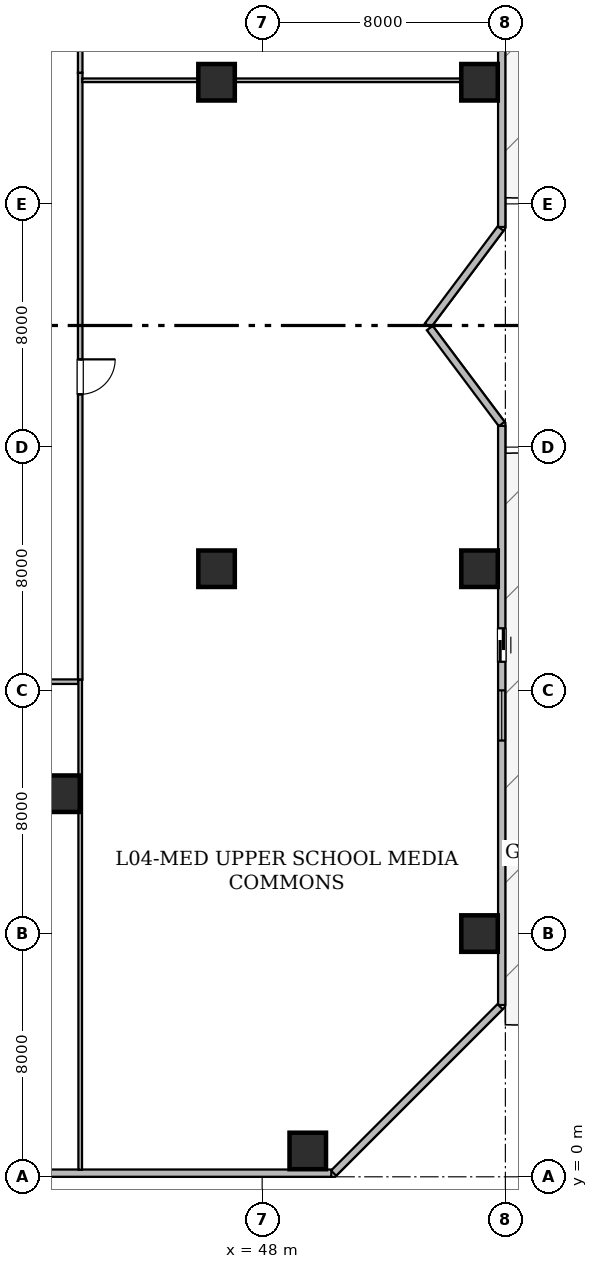
"""IFC4 building model, lengths in metres.
Left out: names, types, materials, properties, quantities, classifications, styles, units other than length and angle.
Written with IfcOpenShell. Run it as: python <this file> out.ifc"""

import sys

from ifc_helpers import new_model, si_unit, direction, frame, frame_2d, origin, origin_2d, place, context, subcontext, project, spatial, rectangle, hollow_rectangle, extrude, element, fill, save


model = new_model("IFC4")
c1 = context("Model", 3, precision=1e-05, world=origin(), true_north=direction((0.0, 1.0)))
c2 = subcontext(c1, "Body", "Model", "MODEL_VIEW")
j1 = project(units=[si_unit("LENGTHUNIT", "METRE"), si_unit("PLANEANGLEUNIT", "RADIAN")], contexts=[c1])
p1 = place(None, origin())
s1 = spatial("IfcSite", under=j1, at=p1, CompositionType="ELEMENT")
p2 = place(p1, origin())
s2 = spatial("IfcBuilding", under=s1, at=p2, CompositionType="ELEMENT")
p3 = place(p2, frame((0.0, 0.0, 20.4)))
s3 = spatial("IfcBuildingStorey", under=s2, at=p3, CompositionType="ELEMENT", Elevation=20.4)
for number, where, z_axis, x_axis in (
    (1, (49.5, 0.85, 0.0), (0.0, 0.0, 1.0), (1.0, 0.0, 0.0)),
    (2, (55.15, 8.0, 0.0), (0.0, 0.0, 1.0), (1.0, 0.0, 0.0)),
    (3, (55.15, 20.0, 0.0), (0.0, 0.0, 1.0), (1.0, 0.0, 0.0)),
    (4, (55.15, 36.0, 0.0), (0.0, 0.0, 1.0), (1.0, 0.0, 0.0)),
    (5, (41.4, 12.6, 0.0), (0.0, 0.0, 1.0), (1.0, 0.0, 0.0)),
    (6, (46.5, 20.0, 0.0), (0.0, 0.0, 1.0), (1.0, 0.0, 0.0)),
    (7, (46.5, 36.0, 0.0), (0.0, 0.0, 1.0), (1.0, 0.0, 0.0)),
):
    element("IfcColumn", number, at=place(p3, frame(where, z_axis=z_axis, x_axis=x_axis)), inside=s3, PredefinedType="COLUMN", context=c2, shape_type="SweptSolid", body=[
        extrude(hollow_rectangle(XDim=1.2, YDim=1.2, WallThickness=0.06, at=origin_2d()), origin(), (0.0, 0.0, 1.0), 4.2),
    ])
p4 = place(p3, frame((55.88, 50.272, 0.0), z_axis=(0.0, 0.0, 1.0), x_axis=(0.0, -1.0, 0.0)))
e8 = element("IfcWall", 8, at=p4, inside=s3, PredefinedType="STANDARD", context=c2, shape_type="SweptSolid", body=[
    extrude(rectangle(XDim=19.032, YDim=0.24, at=frame_2d((9.516, 0.0))), origin(), (0.0, 0.0, 1.0), 3.92),
])
p5 = place(p4, frame((5.0, 0.0, 0.0)))
e9 = element("IfcOpeningElement", 9, at=p5, cuts=e8, PredefinedType="OPENING", context=c2, shape_type="SweptSolid", body=[
    extrude(rectangle(XDim=1.1, YDim=2.2, at=frame_2d((0.55, 1.1))), frame((0.0, 0.13, 0.0), z_axis=(0.0, -1.0, 0.0), x_axis=(1.0, 0.0, 0.0)), (0.0, 0.0, 1.0), 0.26),
])
p6 = place(p4, frame((6.591, 0.0, 0.85)))
e10 = element("IfcOpeningElement", 10, at=p6, cuts=e8, PredefinedType="OPENING", context=c2, shape_type="SweptSolid", body=[
    extrude(rectangle(XDim=1.65, YDim=1.55, at=frame_2d((0.825, 0.775))), frame((0.0, 0.13, 0.0), z_axis=(0.0, -1.0, 0.0), x_axis=(1.0, 0.0, 0.0)), (0.0, 0.0, 1.0), 0.26),
])
p7 = place(p3, frame((55.842, 31.189, 0.0), z_axis=(0.0, 0.0, 1.0), x_axis=(-0.600058791648, -0.799955902889, 0.0)))
e11 = element("IfcWall", 11, at=p7, inside=s3, PredefinedType="STANDARD", context=c2, shape_type="SweptSolid", body=[
    extrude(rectangle(XDim=3.986, YDim=0.24, at=frame_2d((1.993, 0.0))), origin(), (0.0, 0.0, 1.0), 3.92),
])
p8 = place(p3, frame((53.513, 27.916, 0.0), z_axis=(0.0, 0.0, 1.0), x_axis=(0.599990098106, -0.800007426325, 0.0)))
e12 = element("IfcWall", 12, at=p8, inside=s3, PredefinedType="STANDARD", context=c2, shape_type="SweptSolid", body=[
    extrude(rectangle(XDim=3.945, YDim=0.24, at=frame_2d((1.973, 0.0))), origin(), (0.0, 0.0, 1.0), 3.92),
])
p9 = place(p3, frame((55.88, 24.698, 0.0), z_axis=(0.0, 0.0, 1.0), x_axis=(0.0, -1.0, 0.0)))
e13 = element("IfcWall", 13, at=p9, inside=s3, PredefinedType="STANDARD", context=c2, shape_type="SweptSolid", body=[
    extrude(rectangle(XDim=19.048, YDim=0.24, at=frame_2d((9.524, 0.0))), origin(), (0.0, 0.0, 1.0), 3.92),
])
p10 = place(p9, frame((6.658, 0.0, 0.0)))
e14 = element("IfcOpeningElement", 14, at=p10, cuts=e13, PredefinedType="OPENING", context=c2, shape_type="SweptSolid", body=[
    extrude(rectangle(XDim=1.1, YDim=2.2, at=frame_2d((0.55, 1.1))), frame((0.0, 0.13, 0.0), z_axis=(0.0, -1.0, 0.0), x_axis=(1.0, 0.0, 0.0)), (0.0, 0.0, 1.0), 0.26),
])
p11 = place(p9, frame((8.699, 0.0, 0.85)))
e15 = element("IfcOpeningElement", 15, at=p11, cuts=e13, PredefinedType="OPENING", context=c2, shape_type="SweptSolid", body=[
    extrude(rectangle(XDim=1.65, YDim=1.55, at=frame_2d((0.825, 0.775))), frame((0.0, 0.13, 0.0), z_axis=(0.0, -1.0, 0.0), x_axis=(1.0, 0.0, 0.0)), (0.0, 0.0, 1.0), 0.26),
])
p12 = place(p3, frame((55.826, 5.596, 0.0), z_axis=(0.0, 0.0, 1.0), x_axis=(-0.707106781187, -0.707106781187, 0.0)))
e16 = element("IfcWall", 16, at=p12, inside=s3, PredefinedType="STANDARD", context=c2, shape_type="SweptSolid", body=[
    extrude(rectangle(XDim=7.744, YDim=0.24, at=frame_2d((3.872, 0.0))), origin(), (0.0, 0.0, 1.0), 3.92),
])
p13 = place(p3, frame((50.275, 0.12, 0.0), z_axis=(0.0, 0.0, 1.0), x_axis=(-1.0, 0.0, 0.0)))
e17 = element("IfcWall", 17, at=p13, inside=s3, PredefinedType="STANDARD", context=c2, shape_type="SweptSolid", body=[
    extrude(rectangle(XDim=44.55, YDim=0.24, at=frame_2d((22.275, 0.0))), origin(), (0.0, 0.0, 1.0), 3.92),
])
p14 = place(p13, frame((15.35, 0.0, 0.85)))
e18 = element("IfcOpeningElement", 18, at=p14, cuts=e17, PredefinedType="OPENING", context=c2, shape_type="SweptSolid", body=[
    extrude(rectangle(XDim=1.65, YDim=1.55, at=frame_2d((0.825, 0.775))), frame((0.0, 0.13, 0.0), z_axis=(0.0, -1.0, 0.0), x_axis=(1.0, 0.0, 0.0)), (0.0, 0.0, 1.0), 0.26),
])
p15 = place(p3, frame((42.015, 36.314, 0.0), z_axis=(0.0, 0.0, 1.0), x_axis=(0.0, -1.0, 0.0)))
e19 = element("IfcWall", 19, at=p15, inside=s3, PredefinedType="STANDARD", context=c2, shape_type="SweptSolid", body=[
    extrude(rectangle(XDim=19.964, YDim=0.15, at=frame_2d((9.982, 0.0))), origin(), (0.0, 0.0, 1.0), 3.055),
])
p16 = place(p15, frame((9.428, 0.0, 0.0)))
e20 = element("IfcOpeningElement", 20, at=p16, cuts=e19, PredefinedType="OPENING", context=c2, shape_type="SweptSolid", body=[
    extrude(rectangle(XDim=1.15, YDim=2.2, at=frame_2d((0.575, 1.1))), frame((0.0, 0.085, 0.0), z_axis=(0.0, -1.0, 0.0), x_axis=(1.0, 0.0, 0.0)), (0.0, 0.0, 1.0), 0.17),
])
p17 = place(p3, frame((42.015, 39.65, 0.0), z_axis=(0.0, 0.0, 1.0), x_axis=(0.0, -1.0, 0.0)))
e21 = element("IfcWall", 21, at=p17, inside=s3, PredefinedType="STANDARD", context=c2, shape_type="SweptSolid", body=[
    extrude(rectangle(XDim=3.336, YDim=0.15, at=frame_2d((1.668, 0.0))), origin(), (0.0, 0.0, 1.0), 3.055),
])
p18 = place(p17, frame((1.093, 0.0, 0.0)))
e22 = element("IfcOpeningElement", 22, at=p18, cuts=e21, PredefinedType="OPENING", context=c2, shape_type="SweptSolid", body=[
    extrude(rectangle(XDim=1.15, YDim=2.2, at=frame_2d((0.575, 1.1))), frame((0.0, 0.085, 0.0), z_axis=(0.0, -1.0, 0.0), x_axis=(1.0, 0.0, 0.0)), (0.0, 0.0, 1.0), 0.17),
])
p19 = place(p3, frame((41.95, 16.285, 0.0), z_axis=(0.0, 0.0, 1.0), x_axis=(-1.0, 0.0, 0.0)))
e23 = element("IfcWall", 23, at=p19, inside=s3, PredefinedType="STANDARD", context=c2, shape_type="SweptSolid", body=[
    extrude(rectangle(XDim=15.7, YDim=0.15, at=frame_2d((7.85, 0.0))), origin(), (0.0, 0.0, 1.0), 3.055),
])
p20 = place(p19, frame((7.4, 0.0, 0.0)))
e24 = element("IfcOpeningElement", 24, at=p20, cuts=e23, PredefinedType="OPENING", context=c2, shape_type="SweptSolid", body=[
    extrude(rectangle(XDim=0.9, YDim=2.1, at=frame_2d((0.45, 1.05))), frame((0.0, 0.085, 0.0), z_axis=(0.0, -1.0, 0.0), x_axis=(1.0, 0.0, 0.0)), (0.0, 0.0, 1.0), 0.17),
])
p21 = place(p3, frame((42.082, 36.065, 0.0), z_axis=(0.0, 0.0, 1.0), x_axis=(1.0, 0.0, 0.0)))
e25 = element("IfcWall", 25, at=p21, inside=s3, PredefinedType="PARTITIONING", context=c2, shape_type="SweptSolid", body=[
    extrude(rectangle(XDim=13.318, YDim=0.12, at=frame_2d((6.659, 0.0))), origin(), (0.0, 0.0, 1.0), 3.055),
])
p22 = place(p3, frame((42.015, 0.232, 0.0), z_axis=(0.0, 0.0, 1.0), x_axis=(0.0, 1.0, 0.0)))
e26 = element("IfcWall", 26, at=p22, inside=s3, PredefinedType="PARTITIONING", context=c2, shape_type="SweptSolid", body=[
    extrude(rectangle(XDim=16.118, YDim=0.12, at=frame_2d((8.059, 0.0))), origin(), (0.0, 0.0, 1.0), 3.055),
])
p23 = place(p10, origin())
e27 = element("IfcDoor", 27, at=p23, inside=s3, OperationType="SLIDING_TO_LEFT", PredefinedType="DOOR", context=c2, shape_type="SweptSolid", body=[
    extrude(rectangle(XDim=1.1, YDim=2.2, at=frame_2d((0.55, 1.1))), frame((0.0, 0.025, 0.0), z_axis=(0.0, -1.0, 0.0), x_axis=(1.0, 0.0, 0.0)), (0.0, 0.0, 1.0), 0.05),
])
fill(e14, e27)
p24 = place(p11, origin())
e28 = element("IfcWindow", 28, at=p24, inside=s3, PartitioningType="SINGLE_PANEL", PredefinedType="WINDOW", context=c2, shape_type="SweptSolid", body=[
    extrude(rectangle(XDim=1.65, YDim=1.55, at=frame_2d((0.825, 0.775))), frame((0.0, 0.03, 0.0), z_axis=(0.0, -1.0, 0.0), x_axis=(1.0, 0.0, 0.0)), (0.0, 0.0, 1.0), 0.06),
])
fill(e15, e28)
p25 = place(p16, origin())
e29 = element("IfcDoor", 29, at=p25, inside=s3, OperationType="SINGLE_SWING_LEFT", PredefinedType="DOOR", context=c2, shape_type="SweptSolid", body=[
    extrude(rectangle(XDim=1.15, YDim=2.2, at=frame_2d((0.575, 1.1))), frame((0.0, 0.025, 0.0), z_axis=(0.0, -1.0, 0.0), x_axis=(1.0, 0.0, 0.0)), (0.0, 0.0, 1.0), 0.05),
])
fill(e20, e29)
save(model, sys.argv[1])
